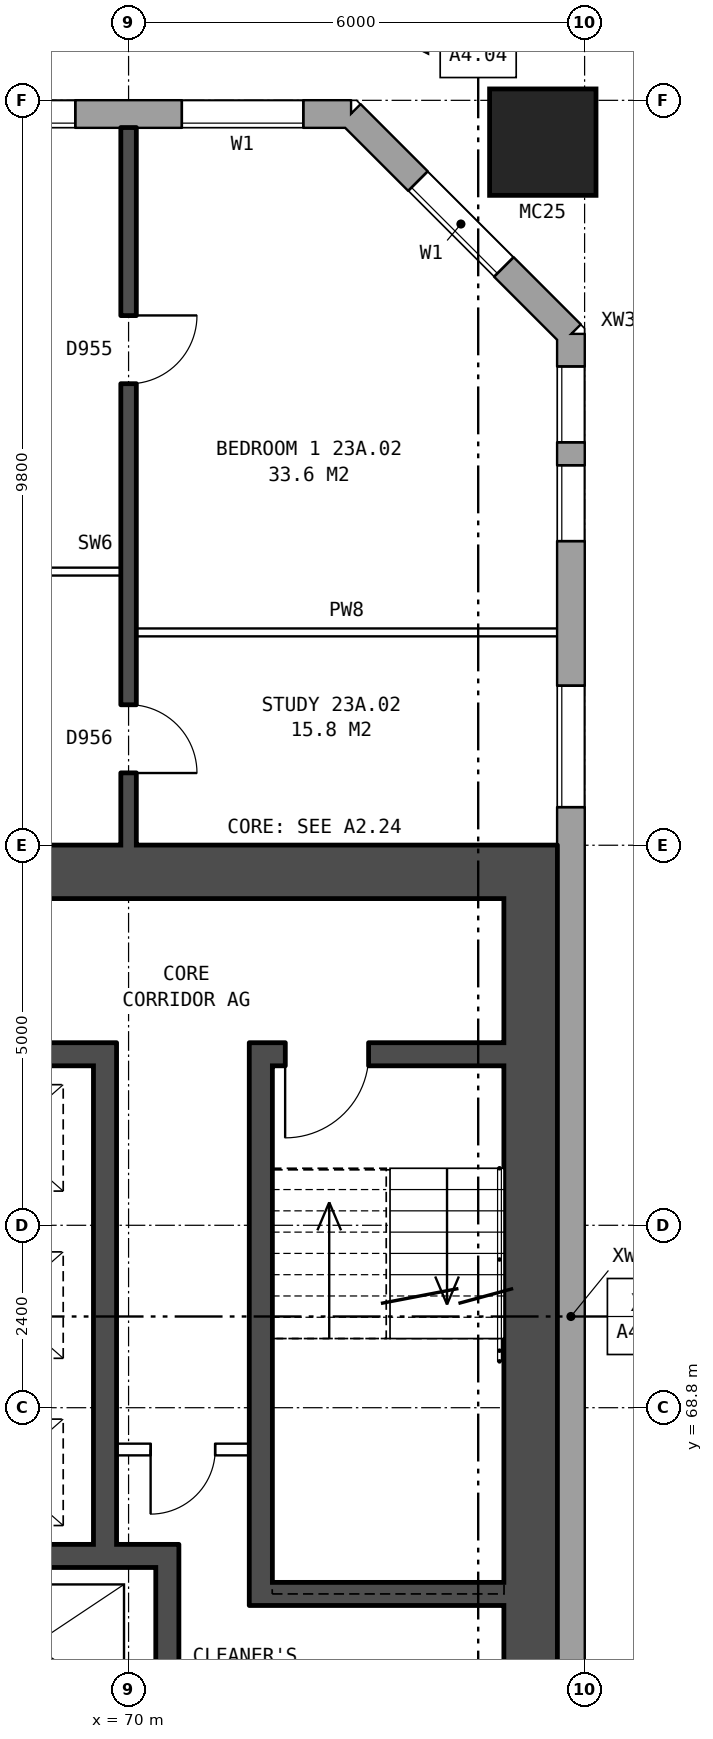
"""IFC4 building model, lengths in metres.
Left out: names, types, materials, properties, quantities, classifications, styles, units other than length and angle.
Written with IfcOpenShell. Run it as: python <this file> out.ifc"""

import sys

from ifc_helpers import new_model, si_unit, direction, frame, frame_2d, origin, origin_2d, place, context, subcontext, project, spatial, rectangle, hollow_rectangle, extrude, element, fill, save


model = new_model("IFC4")
c1 = context("Model", 3, precision=1e-05, world=origin(), true_north=direction((0.0, 1.0)))
c2 = subcontext(c1, "Body", "Model", "MODEL_VIEW")
j1 = project(units=[si_unit("LENGTHUNIT", "METRE"), si_unit("PLANEANGLEUNIT", "RADIAN")], contexts=[c1])
p1 = place(None, origin())
s1 = spatial("IfcSite", under=j1, at=p1, CompositionType="ELEMENT")
p2 = place(p1, origin())
s2 = spatial("IfcBuilding", under=s1, at=p2, CompositionType="ELEMENT")
p3 = place(p2, frame((0.0, 0.0, 84.0)))
s3 = spatial("IfcBuildingStorey", under=s2, at=p3, CompositionType="ELEMENT", Elevation=84.0)
p4 = place(p3, frame((75.45, 85.45, 0.0), z_axis=(0.0, 0.0, 1.0), x_axis=(1.0, 0.0, 0.0)))
e1 = element("IfcColumn", 1, at=p4, inside=s3, PredefinedType="COLUMN", context=c2, shape_type="SweptSolid", body=[
    extrude(hollow_rectangle(XDim=1.4, YDim=1.4, WallThickness=0.075, at=origin_2d()), origin(), (0.0, 0.0, 1.0), 3.1),
])
p5 = place(p3, frame((75.82, 57.075, 0.0), z_axis=(0.0, 0.0, 1.0), x_axis=(0.0, 1.0, 0.0)))
e2 = element("IfcWall", 2, at=p5, inside=s3, PredefinedType="STANDARD", context=c2, shape_type="SweptSolid", body=[
    extrude(rectangle(XDim=25.851, YDim=0.36, at=frame_2d((12.925, 0.0))), origin(), (0.0, 0.0, 1.0), 2.85),
])
p6 = place(p5, frame((0.3, 0.0, 0.8)))
e3 = element("IfcOpeningElement", 3, at=p6, cuts=e2, PredefinedType="OPENING", context=c2, shape_type="SweptSolid", body=[
    extrude(rectangle(XDim=1.0, YDim=1.8, at=frame_2d((0.5, 0.9))), frame((0.0, 0.19, 0.0), z_axis=(0.0, -1.0, 0.0), x_axis=(1.0, 0.0, 0.0)), (0.0, 0.0, 1.0), 0.38),
])
p7 = place(p5, frame((4.625, 0.0, 0.8)))
e4 = element("IfcOpeningElement", 4, at=p7, cuts=e2, PredefinedType="OPENING", context=c2, shape_type="SweptSolid", body=[
    extrude(rectangle(XDim=1.6, YDim=1.8, at=frame_2d((0.8, 0.9))), frame((0.0, 0.19, 0.0), z_axis=(0.0, -1.0, 0.0), x_axis=(1.0, 0.0, 0.0)), (0.0, 0.0, 1.0), 0.38),
])
p8 = place(p5, frame((19.625, 0.0, 0.8)))
e5 = element("IfcOpeningElement", 5, at=p8, cuts=e2, PredefinedType="OPENING", context=c2, shape_type="SweptSolid", body=[
    extrude(rectangle(XDim=1.6, YDim=1.8, at=frame_2d((0.8, 0.9))), frame((0.0, 0.19, 0.0), z_axis=(0.0, -1.0, 0.0), x_axis=(1.0, 0.0, 0.0)), (0.0, 0.0, 1.0), 0.38),
])
p9 = place(p5, frame((23.125, 0.0, 0.8)))
e6 = element("IfcOpeningElement", 6, at=p9, cuts=e2, PredefinedType="OPENING", context=c2, shape_type="SweptSolid", body=[
    extrude(rectangle(XDim=1.0, YDim=0.9, at=frame_2d((0.5, 0.45))), frame((0.0, 0.19, 0.0), z_axis=(0.0, -1.0, 0.0), x_axis=(1.0, 0.0, 0.0)), (0.0, 0.0, 1.0), 0.38),
])
p10 = place(p5, frame((1.6, 0.0, 0.8)))
e7 = element("IfcOpeningElement", 7, at=p10, cuts=e2, PredefinedType="OPENING", context=c2, shape_type="SweptSolid", body=[
    extrude(rectangle(XDim=1.0, YDim=0.9, at=frame_2d((0.5, 0.45))), frame((0.0, 0.19, 0.0), z_axis=(0.0, -1.0, 0.0), x_axis=(1.0, 0.0, 0.0)), (0.0, 0.0, 1.0), 0.38),
])
p11 = place(p5, frame((24.425, 0.0, 0.8)))
e8 = element("IfcOpeningElement", 8, at=p11, cuts=e2, PredefinedType="OPENING", context=c2, shape_type="SweptSolid", body=[
    extrude(rectangle(XDim=1.0, YDim=1.8, at=frame_2d((0.5, 0.9))), frame((0.0, 0.19, 0.0), z_axis=(0.0, -1.0, 0.0), x_axis=(1.0, 0.0, 0.0)), (0.0, 0.0, 1.0), 0.38),
])
p12 = place(p3, frame((75.82, 82.925, 0.0), z_axis=(0.0, 0.0, 1.0), x_axis=(-0.707106781187, 0.707106781187, 0.0)))
e9 = element("IfcWall", 9, at=p12, inside=s3, PredefinedType="STANDARD", context=c2, shape_type="SweptSolid", body=[
    extrude(rectangle(XDim=4.094, YDim=0.36, at=frame_2d((2.047, 0.0))), origin(), (0.0, 0.0, 1.0), 2.85),
])
p13 = place(p12, frame((1.247, 0.0, 0.8)))
e10 = element("IfcOpeningElement", 10, at=p13, cuts=e9, PredefinedType="OPENING", context=c2, shape_type="SweptSolid", body=[
    extrude(rectangle(XDim=1.6, YDim=1.8, at=frame_2d((0.8, 0.9))), frame((0.0, 0.19, 0.0), z_axis=(0.0, -1.0, 0.0), x_axis=(1.0, 0.0, 0.0)), (0.0, 0.0, 1.0), 0.38),
])
p14 = place(p3, frame((72.925, 85.82, 0.0), z_axis=(0.0, 0.0, 1.0), x_axis=(-1.0, 0.0, 0.0)))
e11 = element("IfcWall", 11, at=p14, inside=s3, PredefinedType="STANDARD", context=c2, shape_type="SweptSolid", body=[
    extrude(rectangle(XDim=46.601, YDim=0.36, at=frame_2d((23.3, 0.0))), origin(), (0.0, 0.0, 1.0), 2.85),
])
p15 = place(p14, frame((0.625, 0.0, 0.8)))
e12 = element("IfcOpeningElement", 12, at=p15, cuts=e11, PredefinedType="OPENING", context=c2, shape_type="SweptSolid", body=[
    extrude(rectangle(XDim=1.6, YDim=1.8, at=frame_2d((0.8, 0.9))), frame((0.0, 0.19, 0.0), z_axis=(0.0, -1.0, 0.0), x_axis=(1.0, 0.0, 0.0)), (0.0, 0.0, 1.0), 0.38),
])
p16 = place(p14, frame((3.625, 0.0, 0.8)))
e13 = element("IfcOpeningElement", 13, at=p16, cuts=e11, PredefinedType="OPENING", context=c2, shape_type="SweptSolid", body=[
    extrude(rectangle(XDim=1.6, YDim=1.8, at=frame_2d((0.8, 0.9))), frame((0.0, 0.19, 0.0), z_axis=(0.0, -1.0, 0.0), x_axis=(1.0, 0.0, 0.0)), (0.0, 0.0, 1.0), 0.38),
])
p17 = place(p14, frame((6.625, 0.0, 0.8)))
e14 = element("IfcOpeningElement", 14, at=p17, cuts=e11, PredefinedType="OPENING", context=c2, shape_type="SweptSolid", body=[
    extrude(rectangle(XDim=1.6, YDim=1.8, at=frame_2d((0.8, 0.9))), frame((0.0, 0.19, 0.0), z_axis=(0.0, -1.0, 0.0), x_axis=(1.0, 0.0, 0.0)), (0.0, 0.0, 1.0), 0.38),
])
p18 = place(p14, frame((9.625, 0.0, 0.8)))
e15 = element("IfcOpeningElement", 15, at=p18, cuts=e11, PredefinedType="OPENING", context=c2, shape_type="SweptSolid", body=[
    extrude(rectangle(XDim=1.6, YDim=1.8, at=frame_2d((0.8, 0.9))), frame((0.0, 0.19, 0.0), z_axis=(0.0, -1.0, 0.0), x_axis=(1.0, 0.0, 0.0)), (0.0, 0.0, 1.0), 0.38),
])
p19 = place(p14, frame((12.625, 0.0, 0.8)))
e16 = element("IfcOpeningElement", 16, at=p19, cuts=e11, PredefinedType="OPENING", context=c2, shape_type="SweptSolid", body=[
    extrude(rectangle(XDim=1.6, YDim=1.8, at=frame_2d((0.8, 0.9))), frame((0.0, 0.19, 0.0), z_axis=(0.0, -1.0, 0.0), x_axis=(1.0, 0.0, 0.0)), (0.0, 0.0, 1.0), 0.38),
])
p20 = place(p14, frame((15.125, 0.0, 0.8)))
e17 = element("IfcOpeningElement", 17, at=p20, cuts=e11, PredefinedType="OPENING", context=c2, shape_type="SweptSolid", body=[
    extrude(rectangle(XDim=1.6, YDim=1.8, at=frame_2d((0.8, 0.9))), frame((0.0, 0.19, 0.0), z_axis=(0.0, -1.0, 0.0), x_axis=(1.0, 0.0, 0.0)), (0.0, 0.0, 1.0), 0.38),
])
p21 = place(p14, frame((18.625, 0.0, 0.35)))
e18 = element("IfcOpeningElement", 18, at=p21, cuts=e11, PredefinedType="OPENING", context=c2, shape_type="SweptSolid", body=[
    extrude(rectangle(XDim=0.8, YDim=0.9, at=frame_2d((0.4, 0.45))), frame((0.0, 0.19, 0.0), z_axis=(0.0, -1.0, 0.0), x_axis=(1.0, 0.0, 0.0)), (0.0, 0.0, 1.0), 0.38),
])
p22 = place(p14, frame((21.625, 0.0, 0.8)))
e19 = element("IfcOpeningElement", 19, at=p22, cuts=e11, PredefinedType="OPENING", context=c2, shape_type="SweptSolid", body=[
    extrude(rectangle(XDim=1.6, YDim=1.8, at=frame_2d((0.8, 0.9))), frame((0.0, 0.19, 0.0), z_axis=(0.0, -1.0, 0.0), x_axis=(1.0, 0.0, 0.0)), (0.0, 0.0, 1.0), 0.38),
])
p23 = place(p14, frame((24.625, 0.0, 0.8)))
e20 = element("IfcOpeningElement", 20, at=p23, cuts=e11, PredefinedType="OPENING", context=c2, shape_type="SweptSolid", body=[
    extrude(rectangle(XDim=1.6, YDim=1.8, at=frame_2d((0.8, 0.9))), frame((0.0, 0.19, 0.0), z_axis=(0.0, -1.0, 0.0), x_axis=(1.0, 0.0, 0.0)), (0.0, 0.0, 1.0), 0.38),
])
p24 = place(p14, frame((29.075, 0.0, 1.4)))
e21 = element("IfcOpeningElement", 21, at=p24, cuts=e11, PredefinedType="OPENING", context=c2, shape_type="SweptSolid", body=[
    extrude(rectangle(XDim=1.2, YDim=1.2, at=frame_2d((0.6, 0.6))), frame((0.0, 0.19, 0.0), z_axis=(0.0, -1.0, 0.0), x_axis=(1.0, 0.0, 0.0)), (0.0, 0.0, 1.0), 0.38),
])
p25 = place(p14, frame((30.625, 0.0, 0.8)))
e22 = element("IfcOpeningElement", 22, at=p25, cuts=e11, PredefinedType="OPENING", context=c2, shape_type="SweptSolid", body=[
    extrude(rectangle(XDim=1.6, YDim=1.8, at=frame_2d((0.8, 0.9))), frame((0.0, 0.19, 0.0), z_axis=(0.0, -1.0, 0.0), x_axis=(1.0, 0.0, 0.0)), (0.0, 0.0, 1.0), 0.38),
])
p26 = place(p14, frame((33.625, 0.0, 0.8)))
e23 = element("IfcOpeningElement", 23, at=p26, cuts=e11, PredefinedType="OPENING", context=c2, shape_type="SweptSolid", body=[
    extrude(rectangle(XDim=1.6, YDim=1.8, at=frame_2d((0.8, 0.9))), frame((0.0, 0.19, 0.0), z_axis=(0.0, -1.0, 0.0), x_axis=(1.0, 0.0, 0.0)), (0.0, 0.0, 1.0), 0.38),
])
p27 = place(p14, frame((36.625, 0.0, 0.8)))
e24 = element("IfcOpeningElement", 24, at=p27, cuts=e11, PredefinedType="OPENING", context=c2, shape_type="SweptSolid", body=[
    extrude(rectangle(XDim=1.6, YDim=1.8, at=frame_2d((0.8, 0.9))), frame((0.0, 0.19, 0.0), z_axis=(0.0, -1.0, 0.0), x_axis=(1.0, 0.0, 0.0)), (0.0, 0.0, 1.0), 0.38),
])
p28 = place(p14, frame((39.625, 0.0, 0.8)))
e25 = element("IfcOpeningElement", 25, at=p28, cuts=e11, PredefinedType="OPENING", context=c2, shape_type="SweptSolid", body=[
    extrude(rectangle(XDim=1.6, YDim=1.8, at=frame_2d((0.8, 0.9))), frame((0.0, 0.19, 0.0), z_axis=(0.0, -1.0, 0.0), x_axis=(1.0, 0.0, 0.0)), (0.0, 0.0, 1.0), 0.38),
])
p29 = place(p14, frame((42.625, 0.0, 0.8)))
e26 = element("IfcOpeningElement", 26, at=p29, cuts=e11, PredefinedType="OPENING", context=c2, shape_type="SweptSolid", body=[
    extrude(rectangle(XDim=1.6, YDim=1.8, at=frame_2d((0.8, 0.9))), frame((0.0, 0.19, 0.0), z_axis=(0.0, -1.0, 0.0), x_axis=(1.0, 0.0, 0.0)), (0.0, 0.0, 1.0), 0.38),
])
p30 = place(p14, frame((17.025, 0.0, 1.5)))
e27 = element("IfcOpeningElement", 27, at=p30, cuts=e11, PredefinedType="OPENING", context=c2, shape_type="SweptSolid", body=[
    extrude(rectangle(XDim=0.6, YDim=0.9, at=frame_2d((0.3, 0.45))), frame((0.0, 0.19, 0.0), z_axis=(0.0, -1.0, 0.0), x_axis=(1.0, 0.0, 0.0)), (0.0, 0.0, 1.0), 0.38),
])
p31 = place(p14, frame((19.725, 0.0, 0.35)))
e28 = element("IfcOpeningElement", 28, at=p31, cuts=e11, PredefinedType="OPENING", context=c2, shape_type="SweptSolid", body=[
    extrude(rectangle(XDim=1.0, YDim=1.8, at=frame_2d((0.5, 0.9))), frame((0.0, 0.19, 0.0), z_axis=(0.0, -1.0, 0.0), x_axis=(1.0, 0.0, 0.0)), (0.0, 0.0, 1.0), 0.38),
])
p32 = place(p3, frame((75.29, 64.5, 0.0), z_axis=(0.0, 0.0, 1.0), x_axis=(0.0, 1.0, 0.0)))
e29 = element("IfcWall", 29, at=p32, inside=s3, PredefinedType="SHEAR", context=c2, shape_type="SweptSolid", body=[
    extrude(rectangle(XDim=11.0, YDim=0.7, at=frame_2d((5.5, 0.0))), origin(), (0.0, 0.0, 1.0), 2.85),
])
p33 = place(p3, frame((66.64, 75.85, 0.0), z_axis=(0.0, 0.0, 1.0), x_axis=(1.0, 0.0, 0.0)))
e30 = element("IfcWall", 30, at=p33, inside=s3, PredefinedType="SHEAR", context=c2, shape_type="SweptSolid", body=[
    extrude(rectangle(XDim=9.0, YDim=0.7, at=frame_2d((4.5, 0.0))), origin(), (0.0, 0.0, 1.0), 2.85),
])
p34 = place(p3, frame((71.89, 66.35, 0.0), z_axis=(0.0, 0.0, 1.0), x_axis=(1.0, 0.0, 0.0)))
e31 = element("IfcWall", 31, at=p34, inside=s3, PredefinedType="SHEAR", context=c2, shape_type="SweptSolid", body=[
    extrude(rectangle(XDim=3.05, YDim=0.3, at=frame_2d((1.525, 0.0))), origin(), (0.0, 0.0, 1.0), 2.85),
])
p35 = place(p3, frame((67.34, 66.85, 0.0), z_axis=(0.0, 0.0, 1.0), x_axis=(1.0, 0.0, 0.0)))
e32 = element("IfcWall", 32, at=p35, inside=s3, PredefinedType="SHEAR", context=c2, shape_type="SweptSolid", body=[
    extrude(rectangle(XDim=3.32, YDim=0.3, at=frame_2d((1.66, 0.0))), origin(), (0.0, 0.0, 1.0), 2.85),
])
p36 = place(p3, frame((69.84, 68.25, 0.0), z_axis=(0.0, 0.0, 1.0), x_axis=(1.0, 0.0, 0.0)))
e33 = element("IfcWall", 33, at=p36, inside=s3, PredefinedType="PARTITIONING", context=c2, shape_type="SweptSolid", body=[
    extrude(rectangle(XDim=1.75, YDim=0.15, at=frame_2d((0.875, 0.0))), origin(), (0.0, 0.0, 1.0), 2.85),
])
p37 = place(p36, frame((0.45, 0.0, 0.0)))
e34 = element("IfcOpeningElement", 34, at=p37, cuts=e33, PredefinedType="OPENING", context=c2, shape_type="SweptSolid", body=[
    extrude(rectangle(XDim=0.85, YDim=2.1, at=frame_2d((0.425, 1.05))), frame((0.0, 0.085, 0.0), z_axis=(0.0, -1.0, 0.0), x_axis=(1.0, 0.0, 0.0)), (0.0, 0.0, 1.0), 0.17),
])
p38 = place(p3, frame((67.34, 73.45, 0.0), z_axis=(0.0, 0.0, 1.0), x_axis=(1.0, 0.0, 0.0)))
e35 = element("IfcWall", 35, at=p38, inside=s3, PredefinedType="SHEAR", context=c2, shape_type="SweptSolid", body=[
    extrude(rectangle(XDim=2.2, YDim=0.3, at=frame_2d((1.1, 0.0))), origin(), (0.0, 0.0, 1.0), 2.85),
])
p39 = place(p3, frame((71.89, 73.45, 0.0), z_axis=(0.0, 0.0, 1.0), x_axis=(1.0, 0.0, 0.0)))
e36 = element("IfcWall", 36, at=p39, inside=s3, PredefinedType="SHEAR", context=c2, shape_type="SweptSolid", body=[
    extrude(rectangle(XDim=3.05, YDim=0.3, at=frame_2d((1.525, 0.0))), origin(), (0.0, 0.0, 1.0), 2.85),
])
p40 = place(p39, frame((0.17, 0.0, 0.0)))
e37 = element("IfcOpeningElement", 37, at=p40, cuts=e36, PredefinedType="OPENING", context=c2, shape_type="SweptSolid", body=[
    extrude(rectangle(XDim=1.1, YDim=2.1, at=frame_2d((0.55, 1.05))), frame((0.0, 0.16, 0.0), z_axis=(0.0, -1.0, 0.0), x_axis=(1.0, 0.0, 0.0)), (0.0, 0.0, 1.0), 0.32),
])
p41 = place(p3, frame((69.69, 67.0, 0.0), z_axis=(0.0, 0.0, 1.0), x_axis=(0.0, 1.0, 0.0)))
e38 = element("IfcWall", 38, at=p41, inside=s3, PredefinedType="SHEAR", context=c2, shape_type="SweptSolid", body=[
    extrude(rectangle(XDim=6.6, YDim=0.3, at=frame_2d((3.3, 0.0))), origin(), (0.0, 0.0, 1.0), 2.85),
])
p42 = place(p3, frame((70.51, 64.5, 0.0), z_axis=(0.0, 0.0, 1.0), x_axis=(0.0, 1.0, 0.0)))
e39 = element("IfcWall", 39, at=p42, inside=s3, PredefinedType="SHEAR", context=c2, shape_type="SweptSolid", body=[
    extrude(rectangle(XDim=2.2, YDim=0.3, at=frame_2d((1.1, 0.0))), origin(), (0.0, 0.0, 1.0), 2.85),
])
p43 = place(p3, frame((71.74, 66.2, 0.0), z_axis=(0.0, 0.0, 1.0), x_axis=(0.0, 1.0, 0.0)))
e40 = element("IfcWall", 40, at=p43, inside=s3, PredefinedType="SHEAR", context=c2, shape_type="SweptSolid", body=[
    extrude(rectangle(XDim=7.4, YDim=0.3, at=frame_2d((3.7, 0.0))), origin(), (0.0, 0.0, 1.0), 2.85),
])
p44 = place(p3, frame((70.1, 79.0, 0.0), z_axis=(0.0, 0.0, 1.0), x_axis=(1.0, 0.0, 0.0)))
e41 = element("IfcWall", 41, at=p44, inside=s3, PredefinedType="PARTITIONING", context=c2, shape_type="SweptSolid", body=[
    extrude(rectangle(XDim=5.54, YDim=0.1, at=frame_2d((2.77, 0.0))), origin(), (0.0, 0.0, 1.0), 2.85),
])
p45 = place(p3, frame((64.1, 79.8, 0.0), z_axis=(0.0, 0.0, 1.0), x_axis=(1.0, 0.0, 0.0)))
e42 = element("IfcWall", 42, at=p45, inside=s3, PredefinedType="PARTITIONING", context=c2, shape_type="SweptSolid", body=[
    extrude(rectangle(XDim=5.8, YDim=0.1, at=frame_2d((2.9, 0.0))), origin(), (0.0, 0.0, 1.0), 2.85),
])
p46 = place(p45, frame((3.6, 0.0, 0.0)))
e43 = element("IfcOpeningElement", 43, at=p46, cuts=e42, PredefinedType="OPENING", context=c2, shape_type="SweptSolid", body=[
    extrude(rectangle(XDim=0.9, YDim=2.1, at=frame_2d((0.45, 1.05))), frame((0.0, 0.06, 0.0), z_axis=(0.0, -1.0, 0.0), x_axis=(1.0, 0.0, 0.0)), (0.0, 0.0, 1.0), 0.12),
])
p47 = place(p45, frame((0.7, 0.0, 0.0)))
e44 = element("IfcOpeningElement", 44, at=p47, cuts=e42, PredefinedType="OPENING", context=c2, shape_type="SweptSolid", body=[
    extrude(rectangle(XDim=0.9, YDim=2.1, at=frame_2d((0.45, 1.05))), frame((0.0, 0.06, 0.0), z_axis=(0.0, -1.0, 0.0), x_axis=(1.0, 0.0, 0.0)), (0.0, 0.0, 1.0), 0.12),
])
p48 = place(p3, frame((70.0, 76.2, 0.0), z_axis=(0.0, 0.0, 1.0), x_axis=(0.0, 1.0, 0.0)))
e45 = element("IfcWall", 45, at=p48, inside=s3, PredefinedType="SOLIDWALL", context=c2, shape_type="SweptSolid", body=[
    extrude(rectangle(XDim=9.44, YDim=0.2, at=frame_2d((4.72, 0.0))), origin(), (0.0, 0.0, 1.0), 2.85),
])
p49 = place(p48, frame((6.07, 0.0, 0.0)))
e46 = element("IfcOpeningElement", 46, at=p49, cuts=e45, PredefinedType="OPENING", context=c2, shape_type="SweptSolid", body=[
    extrude(rectangle(XDim=0.9, YDim=2.1, at=frame_2d((0.45, 1.05))), frame((0.0, 0.11, 0.0), z_axis=(0.0, -1.0, 0.0), x_axis=(1.0, 0.0, 0.0)), (0.0, 0.0, 1.0), 0.22),
])
p50 = place(p48, frame((0.95, 0.0, 0.0)))
e47 = element("IfcOpeningElement", 47, at=p50, cuts=e45, PredefinedType="OPENING", context=c2, shape_type="SweptSolid", body=[
    extrude(rectangle(XDim=0.9, YDim=2.1, at=frame_2d((0.45, 1.05))), frame((0.0, 0.11, 0.0), z_axis=(0.0, -1.0, 0.0), x_axis=(1.0, 0.0, 0.0)), (0.0, 0.0, 1.0), 0.22),
])
p51 = place(p8, origin())
e48 = element("IfcWindow", 48, at=p51, inside=s3, PartitioningType="SINGLE_PANEL", PredefinedType="WINDOW", context=c2, shape_type="SweptSolid", body=[
    extrude(rectangle(XDim=1.6, YDim=1.8, at=frame_2d((0.8, 0.9))), frame((0.0, 0.15, 0.0), z_axis=(0.0, -1.0, 0.0), x_axis=(1.0, 0.0, 0.0)), (0.0, 0.0, 1.0), 0.06),
])
fill(e5, e48)
p52 = place(p9, origin())
e49 = element("IfcWindow", 49, at=p52, inside=s3, PartitioningType="SINGLE_PANEL", PredefinedType="WINDOW", context=c2, shape_type="SweptSolid", body=[
    extrude(rectangle(XDim=1.0, YDim=0.9, at=frame_2d((0.5, 0.45))), frame((0.0, 0.15, 0.0), z_axis=(0.0, -1.0, 0.0), x_axis=(1.0, 0.0, 0.0)), (0.0, 0.0, 1.0), 0.06),
])
fill(e6, e49)
p53 = place(p13, origin())
e50 = element("IfcWindow", 50, at=p53, inside=s3, PartitioningType="SINGLE_PANEL", PredefinedType="WINDOW", context=c2, shape_type="SweptSolid", body=[
    extrude(rectangle(XDim=1.6, YDim=1.8, at=frame_2d((0.8, 0.9))), frame((0.0, 0.15, 0.0), z_axis=(0.0, -1.0, 0.0), x_axis=(1.0, 0.0, 0.0)), (0.0, 0.0, 1.0), 0.06),
])
fill(e10, e50)
p54 = place(p15, origin())
e51 = element("IfcWindow", 51, at=p54, inside=s3, PartitioningType="SINGLE_PANEL", PredefinedType="WINDOW", context=c2, shape_type="SweptSolid", body=[
    extrude(rectangle(XDim=1.6, YDim=1.8, at=frame_2d((0.8, 0.9))), frame((0.0, 0.15, 0.0), z_axis=(0.0, -1.0, 0.0), x_axis=(1.0, 0.0, 0.0)), (0.0, 0.0, 1.0), 0.06),
])
fill(e12, e51)
p55 = place(p16, origin())
e52 = element("IfcWindow", 52, at=p55, inside=s3, PartitioningType="SINGLE_PANEL", PredefinedType="WINDOW", context=c2, shape_type="SweptSolid", body=[
    extrude(rectangle(XDim=1.6, YDim=1.8, at=frame_2d((0.8, 0.9))), frame((0.0, 0.15, 0.0), z_axis=(0.0, -1.0, 0.0), x_axis=(1.0, 0.0, 0.0)), (0.0, 0.0, 1.0), 0.06),
])
fill(e13, e52)
p56 = place(p40, frame((1.1, 0.0, 0.0), z_axis=(0.0, 0.0, 1.0), x_axis=(-1.0, 0.0, 0.0)))
e53 = element("IfcDoor", 53, at=p56, inside=s3, OperationType="SINGLE_SWING_RIGHT", PredefinedType="DOOR", context=c2, shape_type="SweptSolid", body=[
    extrude(rectangle(XDim=1.1, YDim=2.1, at=frame_2d((0.55, 1.05))), frame((0.0, 0.025, 0.0), z_axis=(0.0, -1.0, 0.0), x_axis=(1.0, 0.0, 0.0)), (0.0, 0.0, 1.0), 0.05),
])
fill(e37, e53)
p57 = place(p37, frame((0.85, 0.0, 0.0), z_axis=(0.0, 0.0, 1.0), x_axis=(-1.0, 0.0, 0.0)))
e54 = element("IfcDoor", 54, at=p57, inside=s3, OperationType="SINGLE_SWING_RIGHT", PredefinedType="DOOR", context=c2, shape_type="SweptSolid", body=[
    extrude(rectangle(XDim=0.85, YDim=2.1, at=frame_2d((0.425, 1.05))), frame((0.0, 0.025, 0.0), z_axis=(0.0, -1.0, 0.0), x_axis=(1.0, 0.0, 0.0)), (0.0, 0.0, 1.0), 0.05),
])
fill(e34, e54)
p58 = place(p49, frame((0.9, 0.0, 0.0), z_axis=(0.0, 0.0, 1.0), x_axis=(-1.0, 0.0, 0.0)))
e55 = element("IfcDoor", 55, at=p58, inside=s3, OperationType="SINGLE_SWING_LEFT", PredefinedType="DOOR", context=c2, shape_type="SweptSolid", body=[
    extrude(rectangle(XDim=0.9, YDim=2.1, at=frame_2d((0.45, 1.05))), frame((0.0, 0.025, 0.0), z_axis=(0.0, -1.0, 0.0), x_axis=(1.0, 0.0, 0.0)), (0.0, 0.0, 1.0), 0.05),
])
fill(e46, e55)
p59 = place(p50, frame((0.9, 0.0, 0.0), z_axis=(0.0, 0.0, 1.0), x_axis=(-1.0, 0.0, 0.0)))
e56 = element("IfcDoor", 56, at=p59, inside=s3, OperationType="SINGLE_SWING_RIGHT", PredefinedType="DOOR", context=c2, shape_type="SweptSolid", body=[
    extrude(rectangle(XDim=0.9, YDim=2.1, at=frame_2d((0.45, 1.05))), frame((0.0, 0.025, 0.0), z_axis=(0.0, -1.0, 0.0), x_axis=(1.0, 0.0, 0.0)), (0.0, 0.0, 1.0), 0.05),
])
fill(e47, e56)
p60 = place(p11, origin())
e57 = element("IfcWindow", 57, at=p60, inside=s3, PartitioningType="SINGLE_PANEL", PredefinedType="WINDOW", context=c2, shape_type="SweptSolid", body=[
    extrude(rectangle(XDim=1.0, YDim=1.8, at=frame_2d((0.5, 0.9))), frame((0.0, 0.15, 0.0), z_axis=(0.0, -1.0, 0.0), x_axis=(1.0, 0.0, 0.0)), (0.0, 0.0, 1.0), 0.06),
])
fill(e8, e57)
save(model, sys.argv[1])
